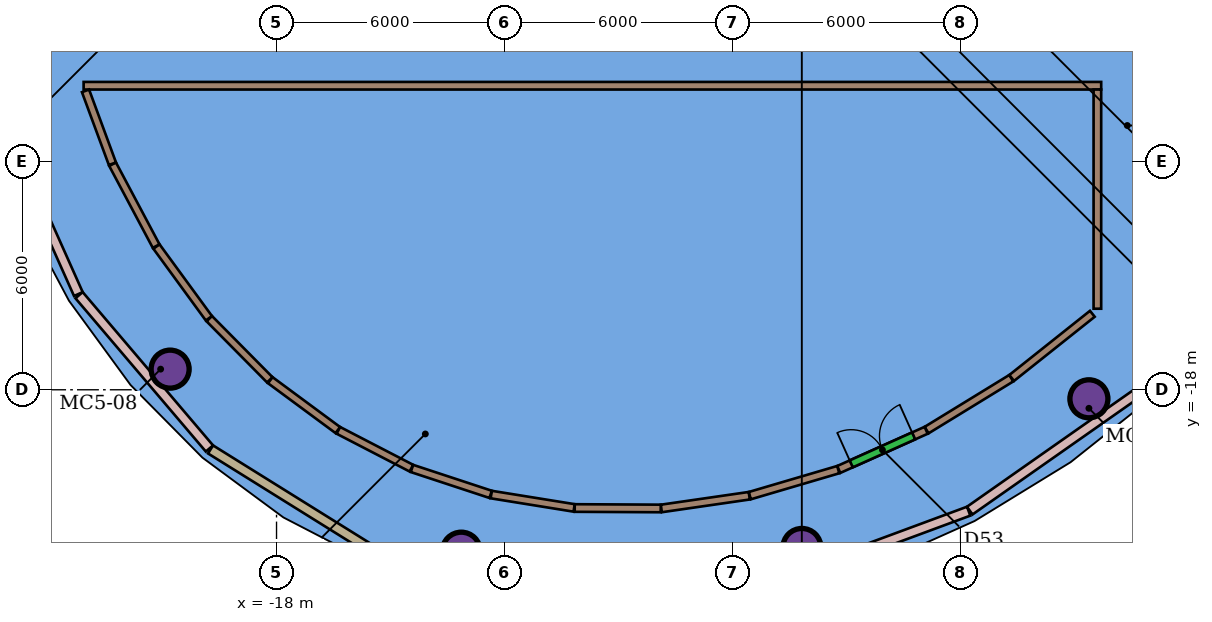
"""IFC4 building model, lengths in metres.
Left out: names, types, materials, properties, quantities, classifications, styles, units other than length and angle.
Written with IfcOpenShell. Run it as: python <this file> out.ifc"""

import sys

from ifc_helpers import new_model, si_unit, direction, frame, frame_2d, origin, origin_2d, place, context, subcontext, project, spatial, rectangle, hollow_circle, extrude, element, fill, save


model = new_model("IFC4")
c1 = context("Model", 3, precision=1e-05, world=origin(), true_north=direction((0.0, 1.0)))
c2 = subcontext(c1, "Body", "Model", "MODEL_VIEW")
j1 = project(units=[si_unit("LENGTHUNIT", "METRE"), si_unit("PLANEANGLEUNIT", "RADIAN")], contexts=[c1])
p1 = place(None, origin())
s1 = spatial("IfcSite", under=j1, at=p1, CompositionType="ELEMENT")
p2 = place(p1, origin())
s2 = spatial("IfcBuilding", under=s1, at=p2, CompositionType="ELEMENT")
p3 = place(p2, frame((0.0, 0.0, 312.9)))
s3 = spatial("IfcBuildingStorey", under=s2, at=p3, CompositionType="ELEMENT", Elevation=312.9)
for number, where, z_axis, x_axis in (
    (1, (-20.8, -17.457, 0.0), (0.0, 0.0, 1.0), (1.0, 0.0, 0.0)),
    (2, (-13.138, -22.247, 0.0), (0.0, 0.0, 1.0), (1.0, 0.0, 0.0)),
    (3, (-4.175, -22.149, 0.0), (0.0, 0.0, 1.0), (1.0, 0.0, 0.0)),
    (4, (3.377, -18.238, 0.0), (0.0, 0.0, 1.0), (1.0, 0.0, 0.0)),
):
    element("IfcColumn", number, at=place(p3, frame(where, z_axis=z_axis, x_axis=x_axis)), inside=s3, PredefinedType="COLUMN", context=c2, shape_type="SweptSolid", body=[
        extrude(hollow_circle(Radius=0.5, WallThickness=0.04, at=origin_2d()), origin(), (0.0, 0.0, 1.0), 4.0),
    ])
p4 = place(p3, frame((-23.076, -10.0, 0.0), z_axis=(0.0, 0.0, 1.0), x_axis=(1.0, 0.0, 0.0)))
e5 = element("IfcWall", 5, at=p4, inside=s3, PredefinedType="PARTITIONING", context=c2, shape_type="SweptSolid", body=[
    extrude(rectangle(XDim=26.776, YDim=0.2, at=frame_2d((13.388, 0.0))), origin(), (0.0, 0.0, 1.0), 3.65),
])
p5 = place(p3, frame((3.6, -15.867, 0.0), z_axis=(0.0, 0.0, 1.0), x_axis=(0.0, 1.0, 0.0)))
e6 = element("IfcWall", 6, at=p5, inside=s3, PredefinedType="PARTITIONING", context=c2, shape_type="SweptSolid", body=[
    extrude(rectangle(XDim=5.767, YDim=0.2, at=frame_2d((2.884, 0.0))), origin(), (0.0, 0.0, 1.0), 3.65),
])
p6 = place(p3, frame((-0.894, -19.061, 0.0), z_axis=(0.0, 0.0, 1.0), x_axis=(0.852667029926, 0.522454721557, 0.0)))
e7 = element("IfcWall", 7, at=p6, inside=s3, PredefinedType="PARTITIONING", context=c2, shape_type="SweptSolid", body=[
    extrude(rectangle(XDim=2.614, YDim=0.2, at=frame_2d((1.307, 0.0))), origin(), (0.0, 0.0, 1.0), 3.65),
])
p7 = place(p3, frame((-3.206, -20.097, 0.0), z_axis=(0.0, 0.0, 1.0), x_axis=(0.912552955942, 0.408958558538, 0.0)))
e8 = element("IfcWall", 8, at=p7, inside=s3, PredefinedType="PARTITIONING", context=c2, shape_type="SweptSolid", body=[
    extrude(rectangle(XDim=2.521, YDim=0.2, at=frame_2d((1.26, 0.0))), origin(), (0.0, 0.0, 1.0), 3.65),
])
p8 = place(p7, frame((0.36, 0.0, 0.0)))
e9 = element("IfcOpeningElement", 9, at=p8, cuts=e8, PredefinedType="OPENING", context=c2, shape_type="SweptSolid", body=[
    extrude(rectangle(XDim=1.8, YDim=2.4, at=frame_2d((0.9, 1.2))), frame((0.0, 0.11, 0.0), z_axis=(0.0, -1.0, 0.0), x_axis=(1.0, 0.0, 0.0)), (0.0, 0.0, 1.0), 0.22),
])
p9 = place(p3, frame((-5.547, -20.786, 0.0), z_axis=(0.0, 0.0, 1.0), x_axis=(0.95934146389, 0.28224803925, 0.0)))
e10 = element("IfcWall", 10, at=p9, inside=s3, PredefinedType="PARTITIONING", context=c2, shape_type="SweptSolid", body=[
    extrude(rectangle(XDim=2.426, YDim=0.2, at=frame_2d((1.213, 0.0))), origin(), (0.0, 0.0, 1.0), 3.65),
])
p10 = place(p3, frame((-7.875, -21.123, 0.0), z_axis=(0.0, 0.0, 1.0), x_axis=(0.989671979467, 0.143350525141, 0.0)))
e11 = element("IfcWall", 11, at=p10, inside=s3, PredefinedType="PARTITIONING", context=c2, shape_type="SweptSolid", body=[
    extrude(rectangle(XDim=2.338, YDim=0.2, at=frame_2d((1.169, 0.0))), origin(), (0.0, 0.0, 1.0), 3.65),
])
p11 = place(p3, frame((-10.154, -21.111, 0.0), z_axis=(0.0, 0.0, 1.0), x_axis=(0.999986603133, -0.005176248997, 0.0)))
e12 = element("IfcWall", 12, at=p11, inside=s3, PredefinedType="PARTITIONING", context=c2, shape_type="SweptSolid", body=[
    extrude(rectangle(XDim=2.264, YDim=0.2, at=frame_2d((1.132, 0.0))), origin(), (0.0, 0.0, 1.0), 3.65),
])
p12 = place(p3, frame((-12.35, -20.757, 0.0), z_axis=(0.0, 0.0, 1.0), x_axis=(0.987257926423, -0.159128208423, 0.0)))
e13 = element("IfcWall", 13, at=p12, inside=s3, PredefinedType="PARTITIONING", context=c2, shape_type="SweptSolid", body=[
    extrude(rectangle(XDim=2.209, YDim=0.2, at=frame_2d((1.104, 0.0))), origin(), (0.0, 0.0, 1.0), 3.65),
])
p13 = place(p3, frame((-14.437, -20.07, 0.0), z_axis=(0.0, 0.0, 1.0), x_axis=(0.949852302688, -0.312698901627, 0.0)))
e14 = element("IfcWall", 14, at=p13, inside=s3, PredefinedType="PARTITIONING", context=c2, shape_type="SweptSolid", body=[
    extrude(rectangle(XDim=2.181, YDim=0.2, at=frame_2d((1.09, 0.0))), origin(), (0.0, 0.0, 1.0), 3.65),
])
p14 = place(p3, frame((-16.373, -19.068, 0.0), z_axis=(0.0, 0.0, 1.0), x_axis=(0.888068415533, -0.45971131086, 0.0)))
e15 = element("IfcWall", 15, at=p14, inside=s3, PredefinedType="PARTITIONING", context=c2, shape_type="SweptSolid", body=[
    extrude(rectangle(XDim=2.165, YDim=0.2, at=frame_2d((1.082, 0.0))), origin(), (0.0, 0.0, 1.0), 3.65),
])
p15 = place(p3, frame((-18.165, -17.748, 0.0), z_axis=(0.0, 0.0, 1.0), x_axis=(0.80443326696, -0.594043027909, 0.0)))
e16 = element("IfcWall", 16, at=p15, inside=s3, PredefinedType="PARTITIONING", context=c2, shape_type="SweptSolid", body=[
    extrude(rectangle(XDim=2.209, YDim=0.2, at=frame_2d((1.105, 0.0))), origin(), (0.0, 0.0, 1.0), 3.65),
])
p16 = place(p3, frame((-19.77, -16.129, 0.0), z_axis=(0.0, 0.0, 1.0), x_axis=(0.703376280453, -0.710817703843, 0.0)))
e17 = element("IfcWall", 17, at=p16, inside=s3, PredefinedType="PARTITIONING", context=c2, shape_type="SweptSolid", body=[
    extrude(rectangle(XDim=2.264, YDim=0.2, at=frame_2d((1.132, 0.0))), origin(), (0.0, 0.0, 1.0), 3.65),
])
p17 = place(p3, frame((-21.16, -14.231, 0.0), z_axis=(0.0, 0.0, 1.0), x_axis=(0.590082027637, -0.807343297897, 0.0)))
e18 = element("IfcWall", 18, at=p17, inside=s3, PredefinedType="PARTITIONING", context=c2, shape_type="SweptSolid", body=[
    extrude(rectangle(XDim=2.338, YDim=0.2, at=frame_2d((1.169, 0.0))), origin(), (0.0, 0.0, 1.0), 3.65),
])
p18 = place(p3, frame((-22.314, -12.065, 0.0), z_axis=(0.0, 0.0, 1.0), x_axis=(0.469606334902, -0.882875920059, 0.0)))
e19 = element("IfcWall", 19, at=p18, inside=s3, PredefinedType="PARTITIONING", context=c2, shape_type="SweptSolid", body=[
    extrude(rectangle(XDim=2.44, YDim=0.2, at=frame_2d((1.22, 0.0))), origin(), (0.0, 0.0, 1.0), 3.65),
])
p19 = place(p3, frame((-23.026, -10.135, 0.0), z_axis=(0.0, 0.0, 1.0), x_axis=(0.346197844841, -0.938161527791, 0.0)))
e20 = element("IfcWall", 20, at=p19, inside=s3, PredefinedType="PARTITIONING", context=c2, shape_type="SweptSolid", body=[
    extrude(rectangle(XDim=2.044, YDim=0.2, at=frame_2d((1.022, 0.0))), origin(), (0.0, 0.0, 1.0), 3.65),
])
p20 = place(p3, frame((1.345, -17.689, 0.0), z_axis=(0.0, 0.0, 1.0), x_axis=(0.782665833332, 0.62244212047, 0.0)))
e21 = element("IfcWall", 21, at=p20, inside=s3, PredefinedType="PARTITIONING", context=c2, shape_type="SweptSolid", body=[
    extrude(rectangle(XDim=2.712, YDim=0.2, at=frame_2d((1.356, 0.0))), origin(), (0.0, 0.0, 1.0), 3.65),
])
p21 = place(p3, frame((-25.49, -10.39, 0.0), z_axis=(0.0, 0.0, 1.0), x_axis=(0.407989751163, -0.912986507538, 0.0)))
e22 = element("IfcWall", 22, at=p21, inside=s3, PredefinedType="SOLIDWALL", context=c2, shape_type="SweptSolid", body=[
    extrude(rectangle(XDim=5.577, YDim=0.25, at=frame_2d((2.789, 0.0))), origin(), (0.0, 0.0, 1.0), 3.7),
])
p22 = place(p3, frame((-23.196, -15.511, 0.0), z_axis=(0.0, 0.0, 1.0), x_axis=(0.647893308308, -0.761731094973, 0.0)))
e23 = element("IfcWall", 23, at=p22, inside=s3, PredefinedType="SOLIDWALL", context=c2, shape_type="SweptSolid", body=[
    extrude(rectangle(XDim=5.295, YDim=0.25, at=frame_2d((2.647, 0.0))), origin(), (0.0, 0.0, 1.0), 3.7),
])
p23 = place(p3, frame((-19.737, -19.57, 0.0), z_axis=(0.0, 0.0, 1.0), x_axis=(0.84872546146, -0.528833708333, 0.0)))
e24 = element("IfcWall", 24, at=p23, inside=s3, PredefinedType="SOLIDWALL", context=c2, shape_type="SweptSolid", body=[
    extrude(rectangle(XDim=5.125, YDim=0.25, at=frame_2d((2.562, 0.0))), origin(), (0.0, 0.0, 1.0), 4.0),
])
p24 = place(p3, frame((-5.017, -23.131, 0.0), z_axis=(0.0, 0.0, 1.0), x_axis=(0.937764073403, 0.34727300879, 0.0)))
e25 = element("IfcWall", 25, at=p24, inside=s3, PredefinedType="SOLIDWALL", context=c2, shape_type="SweptSolid", body=[
    extrude(rectangle(XDim=5.577, YDim=0.25, at=frame_2d((2.789, 0.0))), origin(), (0.0, 0.0, 1.0), 3.7),
])
p25 = place(p3, frame((0.241, -21.18, 0.0), z_axis=(0.0, 0.0, 1.0), x_axis=(0.818761962214, 0.574133128492, 0.0)))
e26 = element("IfcWall", 26, at=p25, inside=s3, PredefinedType="SOLIDWALL", context=c2, shape_type="SweptSolid", body=[
    extrude(rectangle(XDim=5.885, YDim=0.25, at=frame_2d((2.943, 0.0))), origin(), (0.0, 0.0, 1.0), 3.7),
])
p26 = place(p8, origin())
e27 = element("IfcDoor", 27, at=p26, inside=s3, OperationType="DOUBLE_DOOR_SINGLE_SWING", PredefinedType="DOOR", context=c2, shape_type="SweptSolid", body=[
    extrude(rectangle(XDim=1.8, YDim=2.4, at=frame_2d((0.9, 1.2))), frame((0.0, 0.025, 0.0), z_axis=(0.0, -1.0, 0.0), x_axis=(1.0, 0.0, 0.0)), (0.0, 0.0, 1.0), 0.05),
])
fill(e9, e27)
save(model, sys.argv[1])
